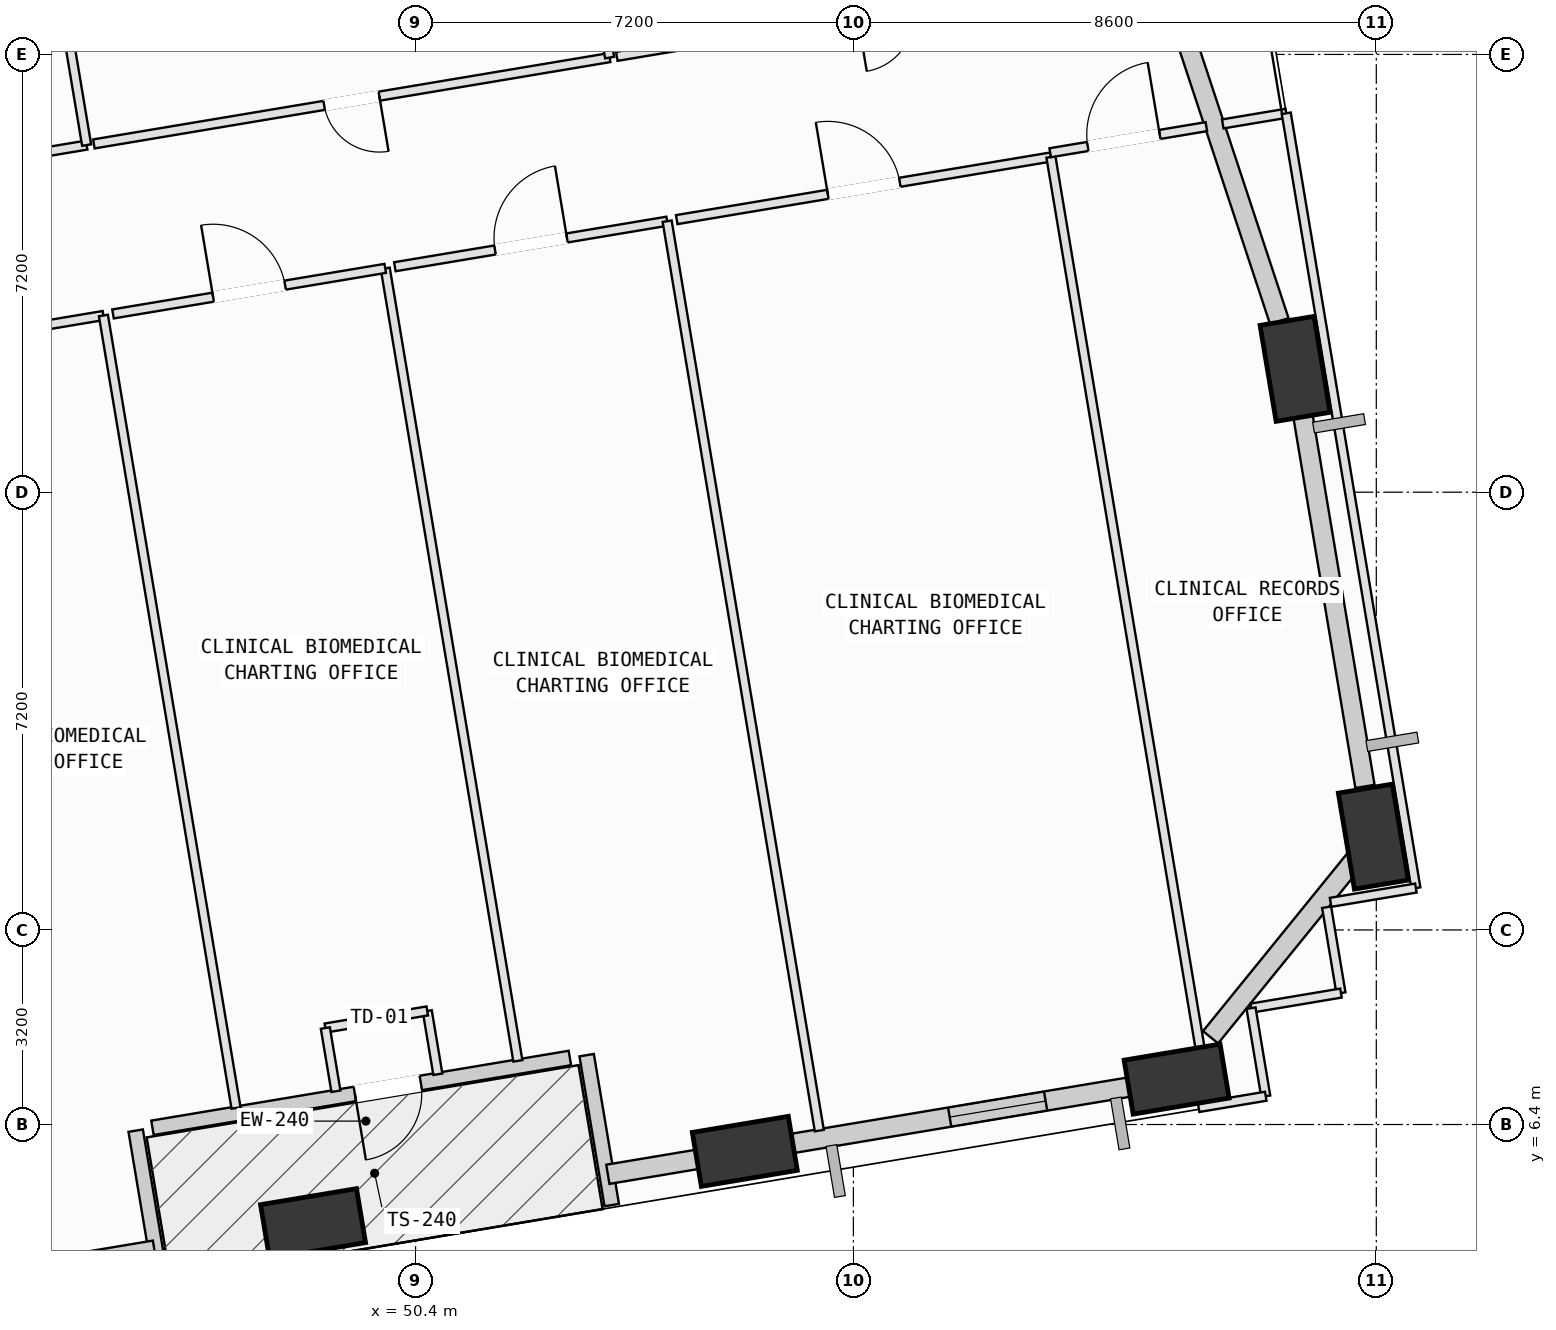
"""IFC4 building model, lengths in metres.
Left out: names, types, materials, properties, quantities, classifications, styles, units other than length and angle.
Written with IfcOpenShell. Run it as: python <this file> out.ifc"""

import sys

from ifc_helpers import new_model, si_unit, direction, frame, frame_2d, origin, origin_2d, place, context, subcontext, project, spatial, rectangle, extrude, element, fill, save


model = new_model("IFC4")
c1 = context("Model", 3, precision=1e-05, world=origin(), true_north=direction((0.0, 1.0)))
c2 = subcontext(c1, "Body", "Model", "MODEL_VIEW")
j1 = project(units=[si_unit("LENGTHUNIT", "METRE"), si_unit("PLANEANGLEUNIT", "RADIAN")], contexts=[c1])
p1 = place(None, origin())
s1 = spatial("IfcSite", under=j1, at=p1, CompositionType="ELEMENT")
p2 = place(p1, origin())
s2 = spatial("IfcBuilding", under=s1, at=p2, CompositionType="ELEMENT")
p3 = place(p2, frame((0.0, 0.0, 63.0)))
s3 = spatial("IfcBuildingStorey", under=s2, at=p3, CompositionType="ELEMENT", Elevation=63.0)
p4 = place(p3, frame((48.713, 4.77, 0.002), z_axis=(0.082085964751, 0.063007509583, 0.994631564011), x_axis=(-0.730759238863, 0.682421599788, 0.01707907958)))
e1 = element("IfcColumn", 1, at=p4, inside=s3, PredefinedType="COLUMN", context=c2, shape_type="SweptSolid", body=[
    extrude(rectangle(XDim=1.6, YDim=0.9, at=origin_2d()), origin(), (0.0, 0.0, 1.0), 4.018),
])
p5 = place(p3, frame((55.815, 5.958, 0.002), z_axis=(0.076778901865, 0.092061906028, 0.992788802156), x_axis=(-0.862388009192, 0.505861109225, 0.019785342446)))
e2 = element("IfcColumn", 2, at=p5, inside=s3, PredefinedType="COLUMN", context=c2, shape_type="SweptSolid", body=[
    extrude(rectangle(XDim=1.6, YDim=0.9, at=origin_2d()), origin(), (0.0, 0.0, 1.0), 4.026),
])
p6 = place(p3, frame((62.916, 7.146, 0.002), z_axis=(0.071489462254, 0.120903075335, 0.990086714971), x_axis=(-0.932148157714, 0.361334193252, 0.023182166775)))
e3 = element("IfcColumn", 3, at=p6, inside=s3, PredefinedType="COLUMN", context=c2, shape_type="SweptSolid", body=[
    extrude(rectangle(XDim=1.6, YDim=0.9, at=origin_2d()), origin(), (0.0, 0.0, 1.0), 4.037),
])
p7 = place(p3, frame((66.152, 11.135, 0.002), z_axis=(0.05494339696, 0.133943418772, 0.989464695529), x_axis=(-0.217662389184, -0.965522875394, 0.142788870106)))
e4 = element("IfcColumn", 4, at=p7, inside=s3, PredefinedType="COLUMN", context=c2, shape_type="SweptSolid", body=[
    extrude(rectangle(XDim=1.6, YDim=0.9, at=origin_2d()), origin(), (0.0, 0.0, 1.0), 4.039),
])
p8 = place(p3, frame((64.865, 18.828, 0.002), z_axis=(0.023437665481, 0.128695191593, 0.991407193588), x_axis=(-0.012818132677, -0.991559406164, 0.129017981395)))
e5 = element("IfcColumn", 5, at=p8, inside=s3, PredefinedType="COLUMN", context=c2, shape_type="SweptSolid", body=[
    extrude(rectangle(XDim=1.6, YDim=0.9, at=origin_2d()), origin(), (0.0, 0.0, 1.0), 4.031),
])
p9 = place(p3, frame((52.938, 7.494, 0.0), z_axis=(0.0, 0.0, 1.0), x_axis=(-0.986280873968, -0.165075854213, 0.0)))
e6 = element("IfcWall", 6, at=p9, inside=s3, PredefinedType="SOLIDWALL", context=c2, shape_type="SweptSolid", body=[
    extrude(rectangle(XDim=6.96, YDim=0.24, at=frame_2d((3.48, 0.0))), origin(), (0.0, 0.0, 1.0), 3.165),
])
p10 = place(p9, frame((2.485, 0.0, 0.0)))
e7 = element("IfcOpeningElement", 7, at=p10, cuts=e6, PredefinedType="OPENING", context=c2, shape_type="SweptSolid", body=[
    extrude(rectangle(XDim=1.1, YDim=2.15, at=frame_2d((0.55, 1.075))), frame((0.0, 0.13, 0.0), z_axis=(0.0, -1.0, 0.0), x_axis=(1.0, 0.0, 0.0)), (0.0, 0.0, 1.0), 0.26),
])
for number, where, z_axis, x_axis in (
    (8, (45.797, 6.299, 0.0), (0.0, 0.0, 1.0), (0.165, -0.986, 0.0)),
    (9, (53.626, 5.075, 0.0), (0.0, 0.0, 1.0), (-0.165, 0.986, 0.0)),
):
    element("IfcWall", number, at=place(p3, frame(where, z_axis=z_axis, x_axis=x_axis)), inside=s3, PredefinedType="SOLIDWALL", context=c2, shape_type="SweptSolid", body=[
        extrude(rectangle(XDim=2.5, YDim=0.24, at=frame_2d((1.25, 0.0))), origin(), (0.0, 0.0, 1.0), 3.165),
    ])
p11 = place(p3, frame((46.105, 4.333, 0.0), z_axis=(0.0, 0.0, 1.0), x_axis=(-0.986288568415, -0.165029875517, 0.0)))
e10 = element("IfcWall", 10, at=p11, inside=s3, PredefinedType="SOLIDWALL", context=c2, shape_type="SweptSolid", body=[
    extrude(rectangle(XDim=3.765, YDim=0.32, at=frame_2d((1.882, 0.0))), origin(), (0.0, 0.0, 1.0), 3.145),
])
p12 = place(p3, frame((55.416, 5.891, 0.0), z_axis=(0.0, 0.0, 1.0), x_axis=(-0.98628490639, -0.165051759845, 0.0)))
e11 = element("IfcWall", 11, at=p12, inside=s3, PredefinedType="SOLIDWALL", context=c2, shape_type="SweptSolid", body=[
    extrude(rectangle(XDim=1.88, YDim=0.32, at=frame_2d((0.94, 0.0))), origin(), (0.0, 0.0, 1.0), 3.145),
])
p13 = place(p3, frame((62.536, 7.083, 0.0), z_axis=(0.0, 0.0, 1.0), x_axis=(-0.986287831456, -0.165034279837, 0.0)))
e12 = element("IfcWall", 12, at=p13, inside=s3, PredefinedType="SOLIDWALL", context=c2, shape_type="SweptSolid", body=[
    extrude(rectangle(XDim=6.044, YDim=0.32, at=frame_2d((3.022, 0.0))), origin(), (0.0, 0.0, 1.0), 3.165),
])
p14 = place(p13, frame((1.799, 0.0, 0.75)))
e13 = element("IfcOpeningElement", 13, at=p14, cuts=e12, PredefinedType="OPENING", context=c2, shape_type="SweptSolid", body=[
    extrude(rectangle(XDim=1.6, YDim=1.95, at=frame_2d((0.8, 0.975))), frame((0.0, 0.17, 0.0), z_axis=(0.0, -1.0, 0.0), x_axis=(1.0, 0.0, 0.0)), (0.0, 0.0, 1.0), 0.34),
])
p15 = place(p3, frame((65.949, 10.885, 0.0), z_axis=(0.0, 0.0, 1.0), x_axis=(-0.630047222242, -0.776556821968, 0.0)))
e14 = element("IfcWall", 14, at=p15, inside=s3, PredefinedType="SOLIDWALL", context=c2, shape_type="SweptSolid", body=[
    extrude(rectangle(XDim=3.928, YDim=0.32, at=frame_2d((1.964, 0.0))), origin(), (0.0, 0.0, 1.0), 3.165),
])
p16 = place(p3, frame((64.923, 18.48, 0.0), z_axis=(0.0, 0.0, 1.0), x_axis=(0.165057772246, -0.986283900214, 0.0)))
e15 = element("IfcWall", 15, at=p16, inside=s3, PredefinedType="SOLIDWALL", context=c2, shape_type="SweptSolid", body=[
    extrude(rectangle(XDim=6.61, YDim=0.32, at=frame_2d((3.305, 0.0))), origin(), (0.0, 0.0, 1.0), 3.165),
])
p17 = place(p3, frame((61.902, 27.791, 0.0), z_axis=(0.0, 0.0, 1.0), x_axis=(0.313820376778, -0.949482370094, 0.0)))
e16 = element("IfcWall", 16, at=p17, inside=s3, PredefinedType="SOLIDWALL", context=c2, shape_type="SweptSolid", body=[
    extrude(rectangle(XDim=8.614, YDim=0.32, at=frame_2d((4.307, 0.0))), origin(), (0.0, 0.0, 1.0), 3.165),
])
p18 = place(p3, frame((40.788, 18.956, 0.0), z_axis=(0.0, 0.0, 1.0), x_axis=(0.98626281798, 0.165183697352, 0.0)))
e17 = element("IfcWall", 17, at=p18, inside=s3, PredefinedType="PARTITIONING", context=c2, shape_type="SweptSolid", body=[
    extrude(rectangle(XDim=4.54, YDim=0.15, at=frame_2d((2.27, 0.0))), origin(), (0.0, 0.0, 1.0), 3.78),
])
p19 = place(p18, frame((1.67, 0.0, 0.0)))
e18 = element("IfcOpeningElement", 18, at=p19, cuts=e17, PredefinedType="OPENING", context=c2, shape_type="SweptSolid", body=[
    extrude(rectangle(XDim=1.2, YDim=2.15, at=frame_2d((0.6, 1.075))), frame((0.0, 0.085, 0.0), z_axis=(0.0, -1.0, 0.0), x_axis=(1.0, 0.0, 0.0)), (0.0, 0.0, 1.0), 0.17),
])
for number, where, z_axis, x_axis in (
    (19, (45.266, 19.706, 0.0), (0.0, 0.0, 1.0), (0.165, -0.986, 0.0)),
    (20, (49.901, 20.481, 0.0), (0.0, 0.0, 1.0), (0.165, -0.986, 0.0)),
):
    element("IfcWall", number, at=place(p3, frame(where, z_axis=z_axis, x_axis=x_axis)), inside=s3, PredefinedType="PARTITIONING", context=c2, shape_type="SweptSolid", body=[
        extrude(rectangle(XDim=13.215, YDim=0.15, at=frame_2d((6.607, 0.0))), origin(), (0.0, 0.0, 1.0), 3.78),
    ])
p20 = place(p3, frame((50.766, 7.227, 0.0), z_axis=(0.0, 0.0, 1.0), x_axis=(-0.164924100448, 0.986306261306, 0.0)))
e21 = element("IfcWall", 21, at=p20, inside=s3, PredefinedType="PARTITIONING", context=c2, shape_type="SweptSolid", body=[
    extrude(rectangle(XDim=1.055, YDim=0.15, at=frame_2d((0.528, 0.0))), origin(), (0.0, 0.0, 1.0), 3.78),
])
p21 = place(p3, frame((50.592, 8.268, 0.0), z_axis=(0.0, 0.0, 1.0), x_axis=(-0.98623426922, -0.165354063201, 0.0)))
e22 = element("IfcWall", 22, at=p21, inside=s3, PredefinedType="PARTITIONING", context=c2, shape_type="SweptSolid", body=[
    extrude(rectangle(XDim=1.699, YDim=0.15, at=frame_2d((0.85, 0.0))), origin(), (0.0, 0.0, 1.0), 3.78),
])
p22 = place(p3, frame((48.916, 7.987, 0.0), z_axis=(0.0, 0.0, 1.0), x_axis=(0.165074740846, -0.986281060314, 0.0)))
e23 = element("IfcWall", 23, at=p22, inside=s3, PredefinedType="PARTITIONING", context=c2, shape_type="SweptSolid", body=[
    extrude(rectangle(XDim=1.054, YDim=0.15, at=frame_2d((0.527, 0.0))), origin(), (0.0, 0.0, 1.0), 3.78),
])
p23 = place(p3, frame((45.424, 19.732, 0.0), z_axis=(0.0, 0.0, 1.0), x_axis=(0.986290516722, 0.165018231188, 0.0)))
e24 = element("IfcWall", 24, at=p23, inside=s3, PredefinedType="PARTITIONING", context=c2, shape_type="SweptSolid", body=[
    extrude(rectangle(XDim=4.539, YDim=0.15, at=frame_2d((2.27, 0.0))), origin(), (0.0, 0.0, 1.0), 3.78),
])
p24 = place(p23, frame((1.67, 0.0, 0.0)))
e25 = element("IfcOpeningElement", 25, at=p24, cuts=e24, PredefinedType="OPENING", context=c2, shape_type="SweptSolid", body=[
    extrude(rectangle(XDim=1.2, YDim=2.15, at=frame_2d((0.6, 1.075))), frame((0.0, 0.085, 0.0), z_axis=(0.0, -1.0, 0.0), x_axis=(1.0, 0.0, 0.0)), (0.0, 0.0, 1.0), 0.17),
])
p25 = place(p3, frame((50.059, 20.508, 0.0), z_axis=(0.0, 0.0, 1.0), x_axis=(0.98629783717, 0.164974471946, 0.0)))
e26 = element("IfcWall", 26, at=p25, inside=s3, PredefinedType="PARTITIONING", context=c2, shape_type="SweptSolid", body=[
    extrude(rectangle(XDim=4.54, YDim=0.15, at=frame_2d((2.27, 0.0))), origin(), (0.0, 0.0, 1.0), 3.78),
])
p26 = place(p25, frame((1.67, 0.0, 0.0)))
e27 = element("IfcOpeningElement", 27, at=p26, cuts=e26, PredefinedType="OPENING", context=c2, shape_type="SweptSolid", body=[
    extrude(rectangle(XDim=1.2, YDim=2.15, at=frame_2d((0.6, 1.075))), frame((0.0, 0.085, 0.0), z_axis=(0.0, -1.0, 0.0), x_axis=(1.0, 0.0, 0.0)), (0.0, 0.0, 1.0), 0.17),
])
p27 = place(p3, frame((54.537, 21.257, 0.0), z_axis=(0.0, 0.0, 1.0), x_axis=(0.16504639057, -0.986285804906, 0.0)))
e28 = element("IfcWall", 28, at=p27, inside=s3, PredefinedType="PARTITIONING", context=c2, shape_type="SweptSolid", body=[
    extrude(rectangle(XDim=15.165, YDim=0.15, at=frame_2d((7.583, 0.0))), origin(), (0.0, 0.0, 1.0), 3.78),
])
p28 = place(p3, frame((56.612, 5.858, 0.0), z_axis=(0.0, 0.0, 1.0), x_axis=(-0.986410781231, -0.164297810916, 0.0)))
e29 = element("IfcWall", 29, at=p28, inside=s3, PredefinedType="PARTITIONING", context=c2, shape_type="SweptSolid", body=[
    extrude(rectangle(XDim=1.174, YDim=0.15, at=frame_2d((0.587, 0.0))), origin(), (0.0, 0.0, 1.0), 3.78),
])
p29 = place(p3, frame((54.695, 21.283, 0.0), z_axis=(0.0, 0.0, 1.0), x_axis=(0.986280538422, 0.165077858992, 0.0)))
e30 = element("IfcWall", 30, at=p29, inside=s3, PredefinedType="PARTITIONING", context=c2, shape_type="SweptSolid", body=[
    extrude(rectangle(XDim=6.24, YDim=0.15, at=frame_2d((3.12, 0.0))), origin(), (0.0, 0.0, 1.0), 3.78),
])
p30 = place(p29, frame((2.52, 0.0, 0.0)))
e31 = element("IfcOpeningElement", 31, at=p30, cuts=e30, PredefinedType="OPENING", context=c2, shape_type="SweptSolid", body=[
    extrude(rectangle(XDim=1.2, YDim=2.15, at=frame_2d((0.6, 1.075))), frame((0.0, 0.085, 0.0), z_axis=(0.0, -1.0, 0.0), x_axis=(1.0, 0.0, 0.0)), (0.0, 0.0, 1.0), 0.17),
])
p31 = place(p3, frame((60.849, 22.313, 0.0), z_axis=(0.0, 0.0, 1.0), x_axis=(0.1650362801, -0.986287496753, 0.0)))
e32 = element("IfcWall", 32, at=p31, inside=s3, PredefinedType="PARTITIONING", context=c2, shape_type="SweptSolid", body=[
    extrude(rectangle(XDim=15.53, YDim=0.15, at=frame_2d((7.765, 0.0))), origin(), (0.0, 0.0, 1.0), 3.78),
])
p32 = place(p3, frame((63.412, 6.996, 0.0), z_axis=(0.0, 0.0, 1.0), x_axis=(-0.986308376539, -0.164911450083, 0.0)))
e33 = element("IfcWall", 33, at=p32, inside=s3, PredefinedType="PARTITIONING", context=c2, shape_type="SweptSolid", body=[
    extrude(rectangle(XDim=0.85, YDim=0.15, at=frame_2d((0.425, 0.0))), origin(), (0.0, 0.0, 1.0), 3.78),
])
p33 = place(p3, frame((44.99, 22.509, 0.0), z_axis=(0.0, 0.0, 1.0), x_axis=(-0.986271610427, -0.165131191679, 0.0)))
e34 = element("IfcWall", 34, at=p33, inside=s3, PredefinedType="PARTITIONING", context=c2, shape_type="SweptSolid", body=[
    extrude(rectangle(XDim=8.164, YDim=0.15, at=frame_2d((4.082, 0.0))), origin(), (0.0, 0.0, 1.0), 3.78),
])
p34 = place(p33, frame((3.482, 0.0, 0.0)))
e35 = element("IfcOpeningElement", 35, at=p34, cuts=e34, PredefinedType="OPENING", context=c2, shape_type="SweptSolid", body=[
    extrude(rectangle(XDim=1.2, YDim=2.15, at=frame_2d((0.6, 1.075))), frame((0.0, 0.085, 0.0), z_axis=(0.0, -1.0, 0.0), x_axis=(1.0, 0.0, 0.0)), (0.0, 0.0, 1.0), 0.17),
])
p35 = place(p3, frame((44.552, 25.127, 0.0), z_axis=(0.0, 0.0, 1.0), x_axis=(0.165010492381, -0.986291811486, 0.0)))
e36 = element("IfcWall", 36, at=p35, inside=s3, PredefinedType="PARTITIONING", context=c2, shape_type="SweptSolid", body=[
    extrude(rectangle(XDim=2.654, YDim=0.15, at=frame_2d((1.327, 0.0))), origin(), (0.0, 0.0, 1.0), 3.78),
])
p36 = place(p3, frame((53.591, 23.948, 0.0), z_axis=(0.0, 0.0, 1.0), x_axis=(-0.986276285111, -0.165103268981, 0.0)))
e37 = element("IfcWall", 37, at=p36, inside=s3, PredefinedType="PARTITIONING", context=c2, shape_type="SweptSolid", body=[
    extrude(rectangle(XDim=8.6, YDim=0.15, at=frame_2d((4.3, 0.0))), origin(), (0.0, 0.0, 1.0), 3.78),
])
p37 = place(p36, frame((3.84, 0.0, 0.0)))
e38 = element("IfcOpeningElement", 38, at=p37, cuts=e37, PredefinedType="OPENING", context=c2, shape_type="SweptSolid", body=[
    extrude(rectangle(XDim=0.92, YDim=2.1, at=frame_2d((0.46, 1.05))), frame((0.0, 0.085, 0.0), z_axis=(0.0, -1.0, 0.0), x_axis=(1.0, 0.0, 0.0)), (0.0, 0.0, 1.0), 0.17),
])
p38 = place(p3, frame((53.153, 26.566, 0.0), z_axis=(0.0, 0.0, 1.0), x_axis=(0.165010492381, -0.986291811486, 0.0)))
e39 = element("IfcWall", 39, at=p38, inside=s3, PredefinedType="PARTITIONING", context=c2, shape_type="SweptSolid", body=[
    extrude(rectangle(XDim=2.654, YDim=0.15, at=frame_2d((1.327, 0.0))), origin(), (0.0, 0.0, 1.0), 3.78),
])
p39 = place(p3, frame((62.535, 25.445, 0.0), z_axis=(0.0, 0.0, 1.0), x_axis=(-0.986283836846, -0.165058150893, 0.0)))
e40 = element("IfcWall", 40, at=p39, inside=s3, PredefinedType="PARTITIONING", context=c2, shape_type="SweptSolid", body=[
    extrude(rectangle(XDim=8.949, YDim=0.15, at=frame_2d((4.474, 0.0))), origin(), (0.0, 0.0, 1.0), 3.78),
])
p40 = place(p39, frame((4.014, 0.0, 0.0)))
e41 = element("IfcOpeningElement", 41, at=p40, cuts=e40, PredefinedType="OPENING", context=c2, shape_type="SweptSolid", body=[
    extrude(rectangle(XDim=0.92, YDim=2.1, at=frame_2d((0.46, 1.05))), frame((0.0, 0.085, 0.0), z_axis=(0.0, -1.0, 0.0), x_axis=(1.0, 0.0, 0.0)), (0.0, 0.0, 1.0), 0.17),
])
p41 = place(p3, frame((65.383, 9.974, 0.0), z_axis=(0.0, 0.0, 1.0), x_axis=(0.164730817823, -0.986338561377, 0.0)))
e42 = element("IfcWall", 42, at=p41, inside=s3, PredefinedType="PARTITIONING", context=c2, shape_type="SweptSolid", body=[
    extrude(rectangle(XDim=1.432, YDim=0.15, at=frame_2d((0.716, 0.0))), origin(), (0.0, 0.0, 1.0), 3.78),
])
p42 = place(p3, frame((65.619, 8.562, 0.0), z_axis=(0.0, 0.0, 1.0), x_axis=(-0.986226216446, -0.165402085822, 0.0)))
e43 = element("IfcWall", 43, at=p42, inside=s3, PredefinedType="PARTITIONING", context=c2, shape_type="SweptSolid", body=[
    extrude(rectangle(XDim=1.5, YDim=0.15, at=frame_2d((0.75, 0.0))), origin(), (0.0, 0.0, 1.0), 3.78),
])
p43 = place(p3, frame((64.14, 8.314, 0.0), z_axis=(0.0, 0.0, 1.0), x_axis=(0.164857105601, -0.986317461436, 0.0)))
e44 = element("IfcWall", 44, at=p43, inside=s3, PredefinedType="PARTITIONING", context=c2, shape_type="SweptSolid", body=[
    extrude(rectangle(XDim=1.469, YDim=0.15, at=frame_2d((0.734, 0.0))), origin(), (0.0, 0.0, 1.0), 3.78),
])
p44 = place(p3, frame((64.382, 6.865, 0.0), z_axis=(0.0, 0.0, 1.0), x_axis=(-0.986240236993, -0.165318465201, 0.0)))
e45 = element("IfcWall", 45, at=p44, inside=s3, PredefinedType="PARTITIONING", context=c2, shape_type="SweptSolid", body=[
    extrude(rectangle(XDim=1.119, YDim=0.15, at=frame_2d((0.56, 0.0))), origin(), (0.0, 0.0, 1.0), 3.78),
])
p45 = place(p3, frame((60.837, 22.383, 0.0), z_axis=(0.0, 0.0, 1.0), x_axis=(0.98633557421, 0.164748702718, 0.0)))
e46 = element("IfcWall", 46, at=p45, inside=s3, PredefinedType="PARTITIONING", context=c2, shape_type="SweptSolid", body=[
    extrude(rectangle(XDim=2.604, YDim=0.15, at=frame_2d((1.302, 0.0))), origin(), (0.0, 0.0, 1.0), 3.78),
])
p46 = place(p45, frame((0.626, 0.0, 0.0)))
e47 = element("IfcOpeningElement", 47, at=p46, cuts=e46, PredefinedType="OPENING", context=c2, shape_type="SweptSolid", body=[
    extrude(rectangle(XDim=1.2, YDim=2.15, at=frame_2d((0.6, 1.075))), frame((0.0, 0.085, 0.0), z_axis=(0.0, -1.0, 0.0), x_axis=(1.0, 0.0, 0.0)), (0.0, 0.0, 1.0), 0.17),
])
p47 = place(p3, frame((63.675, 22.857, 0.0), z_axis=(0.0, 0.0, 1.0), x_axis=(0.986231370716, 0.165371350047, 0.0)))
e48 = element("IfcWall", 48, at=p47, inside=s3, PredefinedType="PARTITIONING", context=c2, shape_type="SweptSolid", body=[
    extrude(rectangle(XDim=1.059, YDim=0.15, at=frame_2d((0.529, 0.0))), origin(), (0.0, 0.0, 1.0), 3.78),
])
p48 = place(p3, frame((64.719, 23.032, 0.0), z_axis=(0.0, 0.0, 1.0), x_axis=(0.165020998917, -0.986290053644, 0.0)))
e49 = element("IfcWall", 49, at=p48, inside=s3, PredefinedType="PARTITIONING", context=c2, shape_type="SweptSolid", body=[
    extrude(rectangle(XDim=12.92, YDim=0.15, at=frame_2d((6.46, 0.0))), origin(), (0.0, 0.0, 1.0), 3.165),
])
p49 = place(p3, frame((66.851, 10.289, 0.0), z_axis=(0.0, 0.0, 1.0), x_axis=(-0.986249764193, -0.165261618743, 0.0)))
e50 = element("IfcWall", 50, at=p49, inside=s3, PredefinedType="PARTITIONING", context=c2, shape_type="SweptSolid", body=[
    extrude(rectangle(XDim=1.423, YDim=0.15, at=frame_2d((0.711, 0.0))), origin(), (0.0, 0.0, 1.0), 3.78),
])
p50 = place(p10, origin())
e51 = element("IfcDoor", 51, at=p50, inside=s3, OperationType="SINGLE_SWING_RIGHT", PredefinedType="DOOR", context=c2, shape_type="SweptSolid", body=[
    extrude(rectangle(XDim=1.1, YDim=2.15, at=frame_2d((0.55, 1.075))), frame((0.0, 0.025, 0.0), z_axis=(0.0, -1.0, 0.0), x_axis=(1.0, 0.0, 0.0)), (0.0, 0.0, 1.0), 0.05),
])
fill(e7, e51)
p51 = place(p14, origin())
e52 = element("IfcWindow", 52, at=p51, inside=s3, PartitioningType="SINGLE_PANEL", PredefinedType="WINDOW", context=c2, shape_type="SweptSolid", body=[
    extrude(rectangle(XDim=1.6, YDim=1.95, at=frame_2d((0.8, 0.975))), frame((0.0, 0.03, 0.0), z_axis=(0.0, -1.0, 0.0), x_axis=(1.0, 0.0, 0.0)), (0.0, 0.0, 1.0), 0.06),
])
fill(e13, e52)
p52 = place(p24, origin())
e53 = element("IfcDoor", 53, at=p52, inside=s3, OperationType="SINGLE_SWING_LEFT", PredefinedType="DOOR", context=c2, shape_type="SweptSolid", body=[
    extrude(rectangle(XDim=1.2, YDim=2.15, at=frame_2d((0.6, 1.075))), frame((0.0, 0.025, 0.0), z_axis=(0.0, -1.0, 0.0), x_axis=(1.0, 0.0, 0.0)), (0.0, 0.0, 1.0), 0.05),
])
fill(e25, e53)
p53 = place(p26, origin())
e54 = element("IfcDoor", 54, at=p53, inside=s3, OperationType="SINGLE_SWING_RIGHT", PredefinedType="DOOR", context=c2, shape_type="SweptSolid", body=[
    extrude(rectangle(XDim=1.2, YDim=2.15, at=frame_2d((0.6, 1.075))), frame((0.0, 0.025, 0.0), z_axis=(0.0, -1.0, 0.0), x_axis=(1.0, 0.0, 0.0)), (0.0, 0.0, 1.0), 0.05),
])
fill(e27, e54)
p54 = place(p30, origin())
e55 = element("IfcDoor", 55, at=p54, inside=s3, OperationType="SINGLE_SWING_LEFT", PredefinedType="DOOR", context=c2, shape_type="SweptSolid", body=[
    extrude(rectangle(XDim=1.2, YDim=2.15, at=frame_2d((0.6, 1.075))), frame((0.0, 0.025, 0.0), z_axis=(0.0, -1.0, 0.0), x_axis=(1.0, 0.0, 0.0)), (0.0, 0.0, 1.0), 0.05),
])
fill(e31, e55)
p55 = place(p37, origin())
e56 = element("IfcDoor", 56, at=p55, inside=s3, OperationType="SINGLE_SWING_LEFT", PredefinedType="DOOR", context=c2, shape_type="SweptSolid", body=[
    extrude(rectangle(XDim=0.92, YDim=2.1, at=frame_2d((0.46, 1.05))), frame((0.0, 0.025, 0.0), z_axis=(0.0, -1.0, 0.0), x_axis=(1.0, 0.0, 0.0)), (0.0, 0.0, 1.0), 0.05),
])
fill(e38, e56)
p56 = place(p46, origin())
e57 = element("IfcDoor", 57, at=p56, inside=s3, OperationType="SINGLE_SWING_RIGHT", PredefinedType="DOOR", context=c2, shape_type="SweptSolid", body=[
    extrude(rectangle(XDim=1.2, YDim=2.15, at=frame_2d((0.6, 1.075))), frame((0.0, 0.025, 0.0), z_axis=(0.0, -1.0, 0.0), x_axis=(1.0, 0.0, 0.0)), (0.0, 0.0, 1.0), 0.05),
])
fill(e47, e57)
save(model, sys.argv[1])
